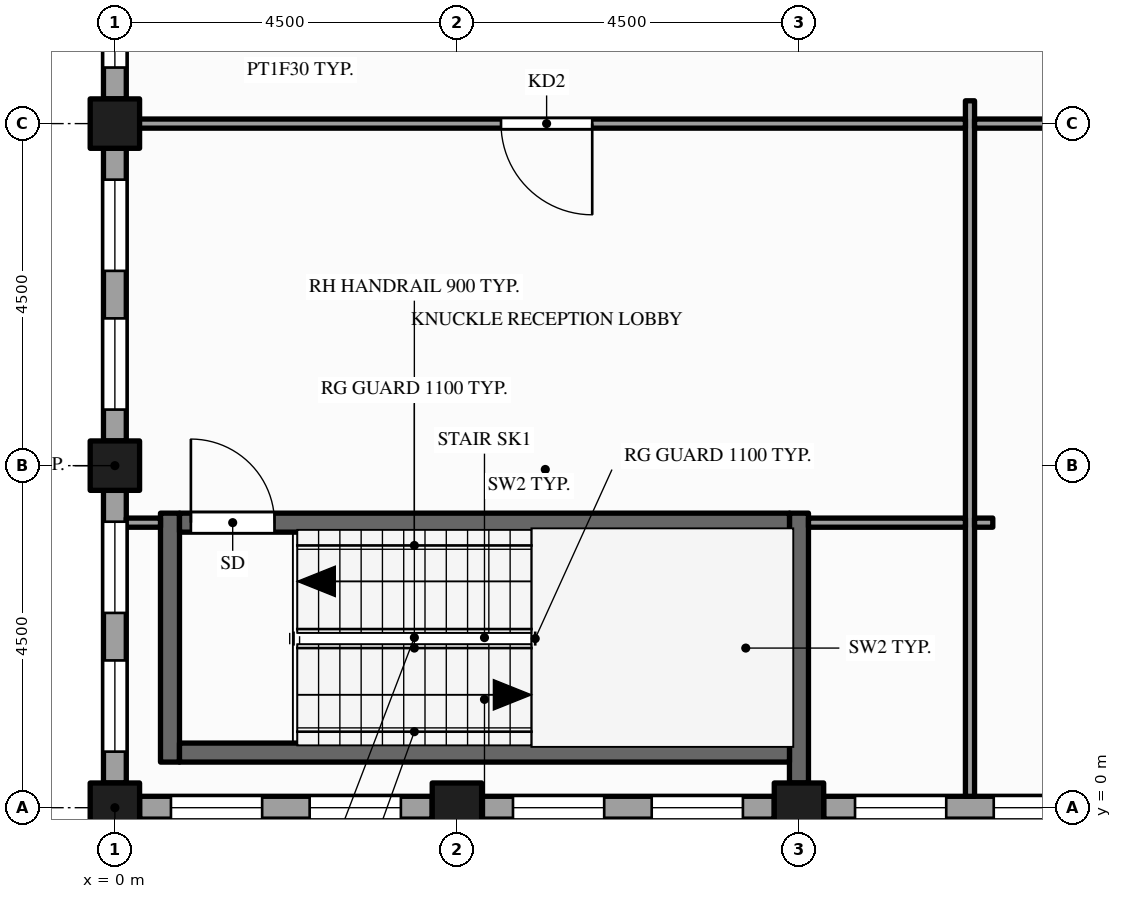
"""IFC4 building model, lengths in metres.
Left out: names, types, materials, properties, quantities, classifications, styles, units other than length and angle.
Written with IfcOpenShell. Run it as: python <this file> out.ifc"""

import sys

from ifc_helpers import new_model, si_unit, direction, frame, frame_2d, origin, origin_2d, place, context, subcontext, project, spatial, rectangle, hollow_rectangle, extrude, element, fill, save


model = new_model("IFC4")
c1 = context("Model", 3, precision=1e-05, world=origin(), true_north=direction((0.0, 1.0)))
c2 = subcontext(c1, "Body", "Model", "MODEL_VIEW")
j1 = project(units=[si_unit("LENGTHUNIT", "METRE"), si_unit("PLANEANGLEUNIT", "RADIAN")], contexts=[c1])
p1 = place(None, origin())
s1 = spatial("IfcSite", under=j1, at=p1, CompositionType="ELEMENT")
p2 = place(p1, origin())
s2 = spatial("IfcBuilding", under=s1, at=p2, CompositionType="ELEMENT")
p3 = place(p2, frame((0.0, 0.0, 289.0)))
s3 = spatial("IfcBuildingStorey", under=s2, at=p3, CompositionType="ELEMENT", Elevation=289.0)
for number, where, z_axis, x_axis in (
    (1, (0.0, 0.0, -0.15), (0.0, 0.0, 1.0), (1.0, 0.0, 0.0)),
    (2, (0.0, 4.5, -0.15), (0.0, 0.0, 1.0), (1.0, 0.0, 0.0)),
    (3, (0.0, 9.0, -0.15), (0.0, 0.0, 1.0), (1.0, 0.0, 0.0)),
    (4, (4.5, 0.0, -0.15), (0.0, 0.0, 1.0), (1.0, 0.0, 0.0)),
    (5, (9.0, 0.0, -0.15), (0.0, 0.0, 1.0), (1.0, 0.0, 0.0)),
):
    element("IfcColumn", number, at=place(p3, frame(where, z_axis=z_axis, x_axis=x_axis)), inside=s3, PredefinedType="COLUMN", context=c2, shape_type="SweptSolid", body=[
        extrude(hollow_rectangle(XDim=0.65, YDim=0.65, WallThickness=0.032, at=origin_2d()), origin(), (0.0, 0.0, 1.0), 4.0),
    ])
p4 = place(p3, frame((0.0, 13.175, 0.0), z_axis=(0.0, 0.0, 1.0), x_axis=(0.0, -1.0, 0.0)))
e6 = element("IfcWall", 6, at=p4, inside=s3, PredefinedType="STANDARD", context=c2, shape_type="SweptSolid", body=[
    extrude(rectangle(XDim=3.85, YDim=0.3, at=frame_2d((1.925, 0.0))), origin(), (0.0, 0.0, 1.0), 3.162),
])
p5 = place(p4, frame((0.413, 0.0, 0.9)))
e7 = element("IfcOpeningElement", 7, at=p5, cuts=e6, PredefinedType="OPENING", context=c2, shape_type="SweptSolid", body=[
    extrude(rectangle(XDim=1.2, YDim=2.0, at=frame_2d((0.6, 1.0))), frame((0.0, 0.16, 0.0), z_axis=(0.0, -1.0, 0.0), x_axis=(1.0, 0.0, 0.0)), (0.0, 0.0, 1.0), 0.32),
])
p6 = place(p4, frame((2.238, 0.0, 0.9)))
e8 = element("IfcOpeningElement", 8, at=p6, cuts=e6, PredefinedType="OPENING", context=c2, shape_type="SweptSolid", body=[
    extrude(rectangle(XDim=1.2, YDim=2.0, at=frame_2d((0.6, 1.0))), frame((0.0, 0.16, 0.0), z_axis=(0.0, -1.0, 0.0), x_axis=(1.0, 0.0, 0.0)), (0.0, 0.0, 1.0), 0.32),
])
p7 = place(p3, frame((0.0, 8.675, 0.0), z_axis=(0.0, 0.0, 1.0), x_axis=(0.0, -1.0, 0.0)))
e9 = element("IfcWall", 9, at=p7, inside=s3, PredefinedType="STANDARD", context=c2, shape_type="SweptSolid", body=[
    extrude(rectangle(XDim=3.85, YDim=0.3, at=frame_2d((1.925, 0.0))), origin(), (0.0, 0.0, 1.0), 3.162),
])
p8 = place(p7, frame((0.413, 0.0, 0.9)))
e10 = element("IfcOpeningElement", 10, at=p8, cuts=e9, PredefinedType="OPENING", context=c2, shape_type="SweptSolid", body=[
    extrude(rectangle(XDim=1.2, YDim=2.0, at=frame_2d((0.6, 1.0))), frame((0.0, 0.16, 0.0), z_axis=(0.0, -1.0, 0.0), x_axis=(1.0, 0.0, 0.0)), (0.0, 0.0, 1.0), 0.32),
])
p9 = place(p7, frame((2.238, 0.0, 0.9)))
e11 = element("IfcOpeningElement", 11, at=p9, cuts=e9, PredefinedType="OPENING", context=c2, shape_type="SweptSolid", body=[
    extrude(rectangle(XDim=1.2, YDim=2.0, at=frame_2d((0.6, 1.0))), frame((0.0, 0.16, 0.0), z_axis=(0.0, -1.0, 0.0), x_axis=(1.0, 0.0, 0.0)), (0.0, 0.0, 1.0), 0.32),
])
p10 = place(p3, frame((0.0, 4.175, 0.0), z_axis=(0.0, 0.0, 1.0), x_axis=(0.0, -1.0, 0.0)))
e12 = element("IfcWall", 12, at=p10, inside=s3, PredefinedType="STANDARD", context=c2, shape_type="SweptSolid", body=[
    extrude(rectangle(XDim=3.85, YDim=0.3, at=frame_2d((1.925, 0.0))), origin(), (0.0, 0.0, 1.0), 3.162),
])
p11 = place(p10, frame((0.413, 0.0, 0.9)))
e13 = element("IfcOpeningElement", 13, at=p11, cuts=e12, PredefinedType="OPENING", context=c2, shape_type="SweptSolid", body=[
    extrude(rectangle(XDim=1.2, YDim=2.0, at=frame_2d((0.6, 1.0))), frame((0.0, 0.16, 0.0), z_axis=(0.0, -1.0, 0.0), x_axis=(1.0, 0.0, 0.0)), (0.0, 0.0, 1.0), 0.32),
])
p12 = place(p10, frame((2.238, 0.0, 0.9)))
e14 = element("IfcOpeningElement", 14, at=p12, cuts=e12, PredefinedType="OPENING", context=c2, shape_type="SweptSolid", body=[
    extrude(rectangle(XDim=1.2, YDim=2.0, at=frame_2d((0.6, 1.0))), frame((0.0, 0.16, 0.0), z_axis=(0.0, -1.0, 0.0), x_axis=(1.0, 0.0, 0.0)), (0.0, 0.0, 1.0), 0.32),
])
p13 = place(p3, frame((0.325, 0.0, 0.0), z_axis=(0.0, 0.0, 1.0), x_axis=(1.0, 0.0, 0.0)))
e15 = element("IfcWall", 15, at=p13, inside=s3, PredefinedType="STANDARD", context=c2, shape_type="SweptSolid", body=[
    extrude(rectangle(XDim=3.85, YDim=0.3, at=frame_2d((1.925, 0.0))), origin(), (0.0, 0.0, 1.0), 3.162),
])
p14 = place(p13, frame((0.413, 0.0, 0.9)))
e16 = element("IfcOpeningElement", 16, at=p14, cuts=e15, PredefinedType="OPENING", context=c2, shape_type="SweptSolid", body=[
    extrude(rectangle(XDim=1.2, YDim=2.0, at=frame_2d((0.6, 1.0))), frame((0.0, 0.16, 0.0), z_axis=(0.0, -1.0, 0.0), x_axis=(1.0, 0.0, 0.0)), (0.0, 0.0, 1.0), 0.32),
])
p15 = place(p13, frame((2.238, 0.0, 0.9)))
e17 = element("IfcOpeningElement", 17, at=p15, cuts=e15, PredefinedType="OPENING", context=c2, shape_type="SweptSolid", body=[
    extrude(rectangle(XDim=1.2, YDim=2.0, at=frame_2d((0.6, 1.0))), frame((0.0, 0.16, 0.0), z_axis=(0.0, -1.0, 0.0), x_axis=(1.0, 0.0, 0.0)), (0.0, 0.0, 1.0), 0.32),
])
p16 = place(p3, frame((4.825, 0.0, 0.0), z_axis=(0.0, 0.0, 1.0), x_axis=(1.0, 0.0, 0.0)))
e18 = element("IfcWall", 18, at=p16, inside=s3, PredefinedType="STANDARD", context=c2, shape_type="SweptSolid", body=[
    extrude(rectangle(XDim=3.85, YDim=0.3, at=frame_2d((1.925, 0.0))), origin(), (0.0, 0.0, 1.0), 3.162),
])
p17 = place(p16, frame((0.413, 0.0, 0.9)))
e19 = element("IfcOpeningElement", 19, at=p17, cuts=e18, PredefinedType="OPENING", context=c2, shape_type="SweptSolid", body=[
    extrude(rectangle(XDim=1.2, YDim=2.0, at=frame_2d((0.6, 1.0))), frame((0.0, 0.16, 0.0), z_axis=(0.0, -1.0, 0.0), x_axis=(1.0, 0.0, 0.0)), (0.0, 0.0, 1.0), 0.32),
])
p18 = place(p16, frame((2.238, 0.0, 0.9)))
e20 = element("IfcOpeningElement", 20, at=p18, cuts=e18, PredefinedType="OPENING", context=c2, shape_type="SweptSolid", body=[
    extrude(rectangle(XDim=1.2, YDim=2.0, at=frame_2d((0.6, 1.0))), frame((0.0, 0.16, 0.0), z_axis=(0.0, -1.0, 0.0), x_axis=(1.0, 0.0, 0.0)), (0.0, 0.0, 1.0), 0.32),
])
p19 = place(p3, frame((9.325, 0.0, 0.0), z_axis=(0.0, 0.0, 1.0), x_axis=(1.0, 0.0, 0.0)))
e21 = element("IfcWall", 21, at=p19, inside=s3, PredefinedType="STANDARD", context=c2, shape_type="SweptSolid", body=[
    extrude(rectangle(XDim=3.85, YDim=0.3, at=frame_2d((1.925, 0.0))), origin(), (0.0, 0.0, 1.0), 2.87),
])
p20 = place(p19, frame((0.413, 0.0, 0.9)))
e22 = element("IfcOpeningElement", 22, at=p20, cuts=e21, PredefinedType="OPENING", context=c2, shape_type="SweptSolid", body=[
    extrude(rectangle(XDim=1.2, YDim=1.75, at=frame_2d((0.6, 0.875))), frame((0.0, 0.16, 0.0), z_axis=(0.0, -1.0, 0.0), x_axis=(1.0, 0.0, 0.0)), (0.0, 0.0, 1.0), 0.32),
])
p21 = place(p19, frame((2.238, 0.0, 0.9)))
e23 = element("IfcOpeningElement", 23, at=p21, cuts=e21, PredefinedType="OPENING", context=c2, shape_type="SweptSolid", body=[
    extrude(rectangle(XDim=1.2, YDim=1.75, at=frame_2d((0.6, 0.875))), frame((0.0, 0.16, 0.0), z_axis=(0.0, -1.0, 0.0), x_axis=(1.0, 0.0, 0.0)), (0.0, 0.0, 1.0), 0.32),
])
p22 = place(p3, frame((0.725, 0.6, 0.0), z_axis=(0.0, 0.0, 1.0), x_axis=(0.0, 1.0, 0.0)))
e24 = element("IfcWall", 24, at=p22, inside=s3, PredefinedType="SHEAR", context=c2, shape_type="SweptSolid", body=[
    extrude(rectangle(XDim=3.275, YDim=0.25, at=frame_2d((1.637, 0.0))), origin(), (0.0, 0.0, 1.0), 3.85),
])
p23 = place(p3, frame((9.0, 0.325, 0.0), z_axis=(0.0, 0.0, 1.0), x_axis=(0.0, 1.0, 0.0)))
e25 = element("IfcWall", 25, at=p23, inside=s3, PredefinedType="SHEAR", context=c2, shape_type="SweptSolid", body=[
    extrude(rectangle(XDim=3.55, YDim=0.25, at=frame_2d((1.775, 0.0))), origin(), (0.0, 0.0, 1.0), 3.85),
])
p24 = place(p3, frame((11.25, 0.15, 0.0), z_axis=(0.0, 0.0, 1.0), x_axis=(0.0, 1.0, 0.0)))
e26 = element("IfcWall", 26, at=p24, inside=s3, PredefinedType="PARTITIONING", context=c2, shape_type="SweptSolid", body=[
    extrude(rectangle(XDim=9.15, YDim=0.12, at=frame_2d((4.575, 0.0))), origin(), (0.0, 0.0, 1.0), 2.87),
])
p25 = place(p3, frame((0.85, 0.725, 0.0), z_axis=(0.0, 0.0, 1.0), x_axis=(1.0, 0.0, 0.0)))
e27 = element("IfcWall", 27, at=p25, inside=s3, PredefinedType="SHEAR", context=c2, shape_type="SweptSolid", body=[
    extrude(rectangle(XDim=8.025, YDim=0.25, at=frame_2d((4.012, 0.0))), origin(), (0.0, 0.0, 1.0), 3.85),
])
p26 = place(p3, frame((0.15, 3.75, 0.0), z_axis=(0.0, 0.0, 1.0), x_axis=(1.0, 0.0, 0.0)))
e28 = element("IfcWall", 28, at=p26, inside=s3, PredefinedType="PARTITIONING", context=c2, shape_type="SweptSolid", body=[
    extrude(rectangle(XDim=0.45, YDim=0.12, at=frame_2d((0.225, 0.0))), origin(), (0.0, 0.0, 1.0), 3.85),
])
p27 = place(p3, frame((0.85, 3.75, 0.0), z_axis=(0.0, 0.0, 1.0), x_axis=(1.0, 0.0, 0.0)))
e29 = element("IfcWall", 29, at=p27, inside=s3, PredefinedType="SHEAR", context=c2, shape_type="SweptSolid", body=[
    extrude(rectangle(XDim=8.025, YDim=0.25, at=frame_2d((4.012, 0.0))), origin(), (0.0, 0.0, 1.0), 3.85),
])
p28 = place(p27, frame((0.15, 0.0, 0.0)))
e30 = element("IfcOpeningElement", 30, at=p28, cuts=e29, PredefinedType="OPENING", context=c2, shape_type="SweptSolid", body=[
    extrude(rectangle(XDim=1.1, YDim=2.1, at=frame_2d((0.55, 1.05))), frame((0.0, 0.135, 0.0), z_axis=(0.0, -1.0, 0.0), x_axis=(1.0, 0.0, 0.0)), (0.0, 0.0, 1.0), 0.27),
])
p29 = place(p3, frame((9.125, 3.75, 0.0), z_axis=(0.0, 0.0, 1.0), x_axis=(1.0, 0.0, 0.0)))
e31 = element("IfcWall", 31, at=p29, inside=s3, PredefinedType="PARTITIONING", context=c2, shape_type="SweptSolid", body=[
    extrude(rectangle(XDim=2.065, YDim=0.12, at=frame_2d((1.032, 0.0))), origin(), (0.0, 0.0, 1.0), 2.87),
])
p30 = place(p3, frame((11.31, 3.75, 0.0), z_axis=(0.0, 0.0, 1.0), x_axis=(1.0, 0.0, 0.0)))
e32 = element("IfcWall", 32, at=p30, inside=s3, PredefinedType="PARTITIONING", context=c2, shape_type="SweptSolid", body=[
    extrude(rectangle(XDim=0.24, YDim=0.12, at=frame_2d((0.12, 0.0))), origin(), (0.0, 0.0, 1.0), 2.87),
])
p31 = place(p3, frame((0.15, 9.0, 0.0), z_axis=(0.0, 0.0, 1.0), x_axis=(1.0, 0.0, 0.0)))
e33 = element("IfcWall", 33, at=p31, inside=s3, PredefinedType="PARTITIONING", context=c2, shape_type="SweptSolid", body=[
    extrude(rectangle(XDim=11.04, YDim=0.12, at=frame_2d((5.52, 0.0))), origin(), (0.0, 0.0, 1.0), 2.87),
])
p32 = place(p31, frame((4.93, 0.0, 0.0)))
e34 = element("IfcOpeningElement", 34, at=p32, cuts=e33, PredefinedType="OPENING", context=c2, shape_type="SweptSolid", body=[
    extrude(rectangle(XDim=1.2, YDim=2.1, at=frame_2d((0.6, 1.05))), frame((0.0, 0.07, 0.0), z_axis=(0.0, -1.0, 0.0), x_axis=(1.0, 0.0, 0.0)), (0.0, 0.0, 1.0), 0.14),
])
p33 = place(p3, frame((11.31, 9.0, 0.0), z_axis=(0.0, 0.0, 1.0), x_axis=(1.0, 0.0, 0.0)))
e35 = element("IfcWall", 35, at=p33, inside=s3, PredefinedType="PARTITIONING", context=c2, shape_type="SweptSolid", body=[
    extrude(rectangle(XDim=4.38, YDim=0.12, at=frame_2d((2.19, 0.0))), origin(), (0.0, 0.0, 1.0), 2.87),
])
p34 = place(p33, frame((1.69, 0.0, 0.0)))
e36 = element("IfcOpeningElement", 36, at=p34, cuts=e35, PredefinedType="OPENING", context=c2, shape_type="SweptSolid", body=[
    extrude(rectangle(XDim=1.0, YDim=2.1, at=frame_2d((0.5, 1.05))), frame((0.0, 0.07, 0.0), z_axis=(0.0, -1.0, 0.0), x_axis=(1.0, 0.0, 0.0)), (0.0, 0.0, 1.0), 0.14),
])
p35 = place(p6, origin())
e37 = element("IfcWindow", 37, at=p35, inside=s3, PartitioningType="SINGLE_PANEL", PredefinedType="WINDOW", context=c2, shape_type="SweptSolid", body=[
    extrude(rectangle(XDim=1.2, YDim=2.0, at=frame_2d((0.6, 1.0))), frame((0.0, 0.03, 0.0), z_axis=(0.0, -1.0, 0.0), x_axis=(1.0, 0.0, 0.0)), (0.0, 0.0, 1.0), 0.06),
])
fill(e8, e37)
p36 = place(p8, origin())
e38 = element("IfcWindow", 38, at=p36, inside=s3, PartitioningType="SINGLE_PANEL", PredefinedType="WINDOW", context=c2, shape_type="SweptSolid", body=[
    extrude(rectangle(XDim=1.2, YDim=2.0, at=frame_2d((0.6, 1.0))), frame((0.0, 0.03, 0.0), z_axis=(0.0, -1.0, 0.0), x_axis=(1.0, 0.0, 0.0)), (0.0, 0.0, 1.0), 0.06),
])
fill(e10, e38)
p37 = place(p9, origin())
e39 = element("IfcWindow", 39, at=p37, inside=s3, PartitioningType="SINGLE_PANEL", PredefinedType="WINDOW", context=c2, shape_type="SweptSolid", body=[
    extrude(rectangle(XDim=1.2, YDim=2.0, at=frame_2d((0.6, 1.0))), frame((0.0, 0.03, 0.0), z_axis=(0.0, -1.0, 0.0), x_axis=(1.0, 0.0, 0.0)), (0.0, 0.0, 1.0), 0.06),
])
fill(e11, e39)
p38 = place(p11, origin())
e40 = element("IfcWindow", 40, at=p38, inside=s3, PartitioningType="SINGLE_PANEL", PredefinedType="WINDOW", context=c2, shape_type="SweptSolid", body=[
    extrude(rectangle(XDim=1.2, YDim=2.0, at=frame_2d((0.6, 1.0))), frame((0.0, 0.03, 0.0), z_axis=(0.0, -1.0, 0.0), x_axis=(1.0, 0.0, 0.0)), (0.0, 0.0, 1.0), 0.06),
])
fill(e13, e40)
p39 = place(p12, origin())
e41 = element("IfcWindow", 41, at=p39, inside=s3, PartitioningType="SINGLE_PANEL", PredefinedType="WINDOW", context=c2, shape_type="SweptSolid", body=[
    extrude(rectangle(XDim=1.2, YDim=2.0, at=frame_2d((0.6, 1.0))), frame((0.0, 0.03, 0.0), z_axis=(0.0, -1.0, 0.0), x_axis=(1.0, 0.0, 0.0)), (0.0, 0.0, 1.0), 0.06),
])
fill(e14, e41)
p40 = place(p14, origin())
e42 = element("IfcWindow", 42, at=p40, inside=s3, PartitioningType="SINGLE_PANEL", PredefinedType="WINDOW", context=c2, shape_type="SweptSolid", body=[
    extrude(rectangle(XDim=1.2, YDim=2.0, at=frame_2d((0.6, 1.0))), frame((0.0, 0.03, 0.0), z_axis=(0.0, -1.0, 0.0), x_axis=(1.0, 0.0, 0.0)), (0.0, 0.0, 1.0), 0.06),
])
fill(e16, e42)
p41 = place(p15, origin())
e43 = element("IfcWindow", 43, at=p41, inside=s3, PartitioningType="SINGLE_PANEL", PredefinedType="WINDOW", context=c2, shape_type="SweptSolid", body=[
    extrude(rectangle(XDim=1.2, YDim=2.0, at=frame_2d((0.6, 1.0))), frame((0.0, 0.03, 0.0), z_axis=(0.0, -1.0, 0.0), x_axis=(1.0, 0.0, 0.0)), (0.0, 0.0, 1.0), 0.06),
])
fill(e17, e43)
p42 = place(p17, origin())
e44 = element("IfcWindow", 44, at=p42, inside=s3, PartitioningType="SINGLE_PANEL", PredefinedType="WINDOW", context=c2, shape_type="SweptSolid", body=[
    extrude(rectangle(XDim=1.2, YDim=2.0, at=frame_2d((0.6, 1.0))), frame((0.0, 0.03, 0.0), z_axis=(0.0, -1.0, 0.0), x_axis=(1.0, 0.0, 0.0)), (0.0, 0.0, 1.0), 0.06),
])
fill(e19, e44)
p43 = place(p18, origin())
e45 = element("IfcWindow", 45, at=p43, inside=s3, PartitioningType="SINGLE_PANEL", PredefinedType="WINDOW", context=c2, shape_type="SweptSolid", body=[
    extrude(rectangle(XDim=1.2, YDim=2.0, at=frame_2d((0.6, 1.0))), frame((0.0, 0.03, 0.0), z_axis=(0.0, -1.0, 0.0), x_axis=(1.0, 0.0, 0.0)), (0.0, 0.0, 1.0), 0.06),
])
fill(e20, e45)
p44 = place(p20, origin())
e46 = element("IfcWindow", 46, at=p44, inside=s3, PartitioningType="SINGLE_PANEL", PredefinedType="WINDOW", context=c2, shape_type="SweptSolid", body=[
    extrude(rectangle(XDim=1.2, YDim=1.75, at=frame_2d((0.6, 0.875))), frame((0.0, 0.03, 0.0), z_axis=(0.0, -1.0, 0.0), x_axis=(1.0, 0.0, 0.0)), (0.0, 0.0, 1.0), 0.06),
])
fill(e22, e46)
p45 = place(p21, origin())
e47 = element("IfcWindow", 47, at=p45, inside=s3, PartitioningType="SINGLE_PANEL", PredefinedType="WINDOW", context=c2, shape_type="SweptSolid", body=[
    extrude(rectangle(XDim=1.2, YDim=1.75, at=frame_2d((0.6, 0.875))), frame((0.0, 0.03, 0.0), z_axis=(0.0, -1.0, 0.0), x_axis=(1.0, 0.0, 0.0)), (0.0, 0.0, 1.0), 0.06),
])
fill(e23, e47)
p46 = place(p28, origin())
e48 = element("IfcDoor", 48, at=p46, inside=s3, OperationType="SINGLE_SWING_LEFT", PredefinedType="DOOR", context=c2, shape_type="SweptSolid", body=[
    extrude(rectangle(XDim=1.1, YDim=2.1, at=frame_2d((0.55, 1.05))), frame((0.0, 0.025, 0.0), z_axis=(0.0, -1.0, 0.0), x_axis=(1.0, 0.0, 0.0)), (0.0, 0.0, 1.0), 0.05),
])
fill(e30, e48)
p47 = place(p32, origin())
e49 = element("IfcDoor", 49, at=p47, inside=s3, OperationType="SINGLE_SWING_RIGHT", PredefinedType="DOOR", context=c2, shape_type="SweptSolid", body=[
    extrude(rectangle(XDim=1.2, YDim=2.1, at=frame_2d((0.6, 1.05))), frame((0.0, 0.025, 0.0), z_axis=(0.0, -1.0, 0.0), x_axis=(1.0, 0.0, 0.0)), (0.0, 0.0, 1.0), 0.05),
])
fill(e34, e49)
save(model, sys.argv[1])
